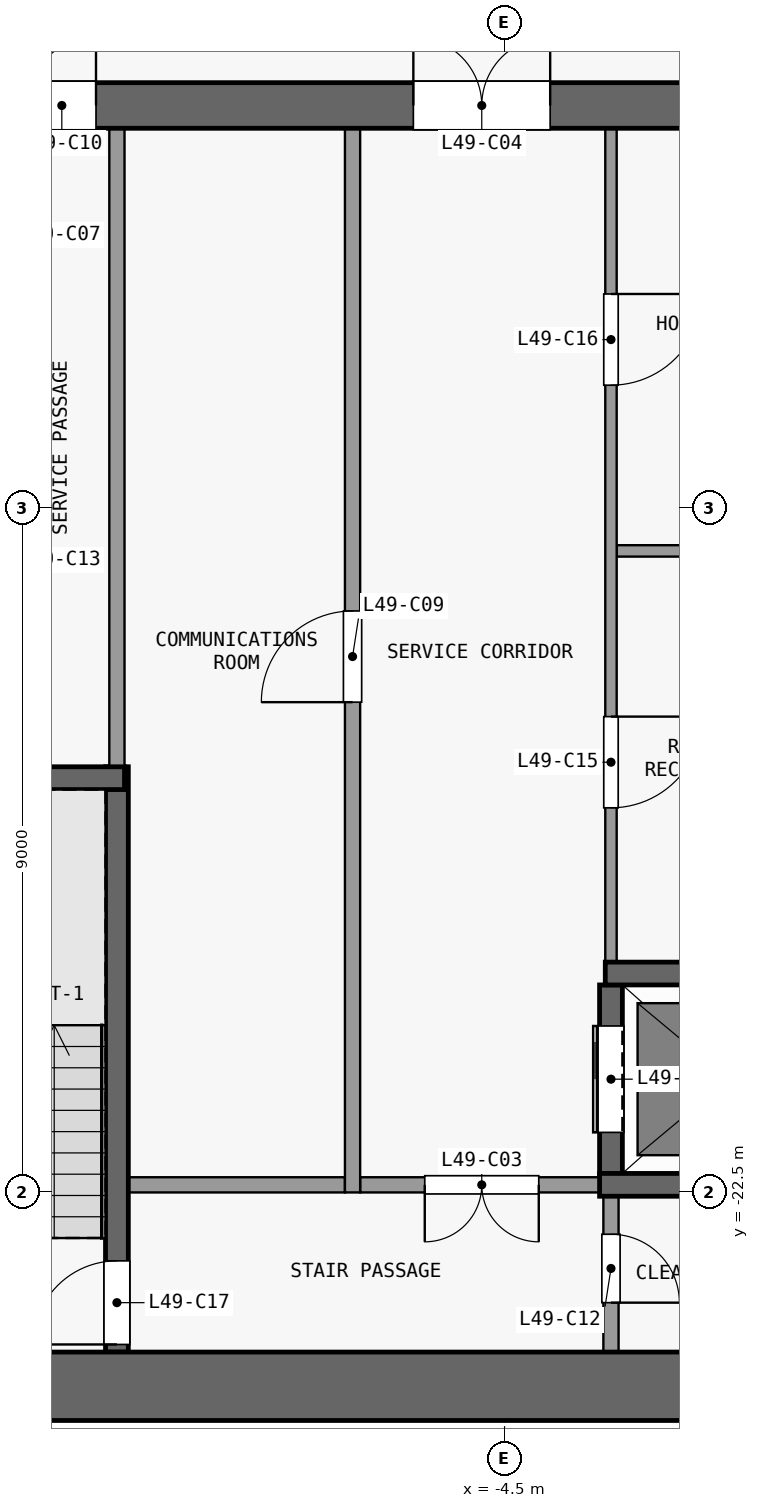
"""IFC4 building model, lengths in metres.
Left out: names, types, materials, properties, quantities, classifications, styles, units other than length and angle.
Written with IfcOpenShell. Run it as: python <this file> out.ifc"""

import sys

from ifc_helpers import new_model, si_unit, direction, frame, frame_2d, origin, place, context, subcontext, project, spatial, rectangle, extrude, element, fill, save


model = new_model("IFC4")
c1 = context("Model", 3, precision=1e-05, world=origin(), true_north=direction((0.0, 1.0)))
c2 = subcontext(c1, "Body", "Model", "MODEL_VIEW")
j1 = project(units=[si_unit("LENGTHUNIT", "METRE"), si_unit("PLANEANGLEUNIT", "RADIAN")], contexts=[c1])
p1 = place(None, origin())
s1 = spatial("IfcSite", under=j1, at=p1, CompositionType="ELEMENT")
p2 = place(p1, origin())
s2 = spatial("IfcBuilding", under=s1, at=p2, CompositionType="ELEMENT")
p3 = place(p2, frame((0.0, 0.0, 196.1)))
s3 = spatial("IfcBuildingStorey", under=s2, at=p3, CompositionType="ELEMENT", Elevation=196.1)
p4 = place(p3, frame((-13.3, -25.05, 0.0), z_axis=(0.0, 0.0, 1.0), x_axis=(1.0, 0.0, 0.0)))
e1 = element("IfcWall", 1, at=p4, inside=s3, PredefinedType="SHEAR", context=c2, shape_type="SweptSolid", body=[
    extrude(rectangle(XDim=26.6, YDim=0.9, at=frame_2d((13.3, 0.0))), origin(), (0.0, 0.0, 1.0), 3.15),
])
p5 = place(p3, frame((-13.3, -8.2, 0.0), z_axis=(0.0, 0.0, 1.0), x_axis=(1.0, 0.0, 0.0)))
e2 = element("IfcWall", 2, at=p5, inside=s3, PredefinedType="SHEAR", context=c2, shape_type="SweptSolid", body=[
    extrude(rectangle(XDim=26.6, YDim=0.6, at=frame_2d((13.3, 0.0))), origin(), (0.0, 0.0, 1.0), 3.15),
])
p6 = place(p5, frame((7.6, 0.0, 0.0)))
e3 = element("IfcOpeningElement", 3, at=p6, cuts=e2, PredefinedType="OPENING", context=c2, shape_type="SweptSolid", body=[
    extrude(rectangle(XDim=1.8, YDim=2.1, at=frame_2d((0.9, 1.05))), frame((0.0, 0.31, 0.0), z_axis=(0.0, -1.0, 0.0), x_axis=(1.0, 0.0, 0.0)), (0.0, 0.0, 1.0), 0.62),
])
p7 = place(p5, frame((17.2, 0.0, 0.0)))
e4 = element("IfcOpeningElement", 4, at=p7, cuts=e2, PredefinedType="OPENING", context=c2, shape_type="SweptSolid", body=[
    extrude(rectangle(XDim=1.8, YDim=2.1, at=frame_2d((0.9, 1.05))), frame((0.0, 0.31, 0.0), z_axis=(0.0, -1.0, 0.0), x_axis=(1.0, 0.0, 0.0)), (0.0, 0.0, 1.0), 0.62),
])
p8 = place(p5, frame((2.525, 0.0, 0.0)))
e5 = element("IfcOpeningElement", 5, at=p8, cuts=e2, PredefinedType="OPENING", context=c2, shape_type="SweptSolid", body=[
    extrude(rectangle(XDim=0.9, YDim=2.1, at=frame_2d((0.45, 1.05))), frame((0.0, 0.31, 0.0), z_axis=(0.0, -1.0, 0.0), x_axis=(1.0, 0.0, 0.0)), (0.0, 0.0, 1.0), 0.62),
])
p9 = place(p5, frame((23.175, 0.0, 0.0)))
e6 = element("IfcOpeningElement", 6, at=p9, cuts=e2, PredefinedType="OPENING", context=c2, shape_type="SweptSolid", body=[
    extrude(rectangle(XDim=0.9, YDim=2.1, at=frame_2d((0.45, 1.05))), frame((0.0, 0.31, 0.0), z_axis=(0.0, -1.0, 0.0), x_axis=(1.0, 0.0, 0.0)), (0.0, 0.0, 1.0), 0.62),
])
p10 = place(p3, frame((-9.45, -22.4, 0.0), z_axis=(0.0, 0.0, 1.0), x_axis=(1.0, 0.0, 0.0)))
e7 = element("IfcWall", 7, at=p10, inside=s3, PredefinedType="PARTITIONING", context=c2, shape_type="SweptSolid", body=[
    extrude(rectangle(XDim=2.85, YDim=0.2, at=frame_2d((1.425, 0.0))), origin(), (0.0, 0.0, 1.0), 3.15),
])
p11 = place(p3, frame((-3.25, -22.4, 0.0), z_axis=(0.0, 0.0, 1.0), x_axis=(-1.0, 0.0, 0.0)))
e8 = element("IfcWall", 8, at=p11, inside=s3, PredefinedType="PARTITIONING", context=c2, shape_type="SweptSolid", body=[
    extrude(rectangle(XDim=3.15, YDim=0.2, at=frame_2d((1.575, 0.0))), origin(), (0.0, 0.0, 1.0), 3.15),
])
p12 = place(p11, frame((0.8, 0.0, 0.0)))
e9 = element("IfcOpeningElement", 9, at=p12, cuts=e8, PredefinedType="OPENING", context=c2, shape_type="SweptSolid", body=[
    extrude(rectangle(XDim=1.5, YDim=2.1, at=frame_2d((0.75, 1.05))), frame((0.0, 0.11, 0.0), z_axis=(0.0, -1.0, 0.0), x_axis=(1.0, 0.0, 0.0)), (0.0, 0.0, 1.0), 0.22),
])
p13 = place(p3, frame((-3.25, -22.4, 0.0), z_axis=(0.0, 0.0, 1.0), x_axis=(1.0, 0.0, 0.0)))
e10 = element("IfcWall", 10, at=p13, inside=s3, PredefinedType="SHEAR", context=c2, shape_type="SweptSolid", body=[
    extrude(rectangle(XDim=6.2, YDim=0.3, at=frame_2d((3.1, 0.0))), origin(), (0.0, 0.0, 1.0), 3.15),
])
p14 = place(p3, frame((-3.175, -19.62, 0.0), z_axis=(0.0, 0.0, 1.0), x_axis=(1.0, 0.0, 0.0)))
e11 = element("IfcWall", 11, at=p14, inside=s3, PredefinedType="SHEAR", context=c2, shape_type="SweptSolid", body=[
    extrude(rectangle(XDim=3.025, YDim=0.3, at=frame_2d((1.513, 0.0))), origin(), (0.0, 0.0, 1.0), 3.15),
])
p15 = place(p3, frame((-12.6, -17.05, 0.0), z_axis=(0.0, 0.0, 1.0), x_axis=(1.0, 0.0, 0.0)))
e12 = element("IfcWall", 12, at=p15, inside=s3, PredefinedType="SHEAR", context=c2, shape_type="SweptSolid", body=[
    extrude(rectangle(XDim=3.1, YDim=0.3, at=frame_2d((1.55, 0.0))), origin(), (0.0, 0.0, 1.0), 3.15),
])
p16 = place(p3, frame((-3.025, -14.06, 0.0), z_axis=(0.0, 0.0, 1.0), x_axis=(1.0, 0.0, 0.0)))
e13 = element("IfcWall", 13, at=p16, inside=s3, PredefinedType="PARTITIONING", context=c2, shape_type="SweptSolid", body=[
    extrude(rectangle(XDim=2.875, YDim=0.15, at=frame_2d((1.438, 0.0))), origin(), (0.0, 0.0, 1.0), 3.15),
])
p17 = place(p3, frame((-9.6, -24.6, 0.0), z_axis=(0.0, 0.0, 1.0), x_axis=(0.0, 1.0, 0.0)))
e14 = element("IfcWall", 14, at=p17, inside=s3, PredefinedType="SHEAR", context=c2, shape_type="SweptSolid", body=[
    extrude(rectangle(XDim=7.7, YDim=0.3, at=frame_2d((3.85, 0.0))), origin(), (0.0, 0.0, 1.0), 3.15),
])
p18 = place(p17, frame((0.1, 0.0, 0.0)))
e15 = element("IfcOpeningElement", 15, at=p18, cuts=e14, PredefinedType="OPENING", context=c2, shape_type="SweptSolid", body=[
    extrude(rectangle(XDim=1.1, YDim=2.1, at=frame_2d((0.55, 1.05))), frame((0.0, 0.16, 0.0), z_axis=(0.0, -1.0, 0.0), x_axis=(1.0, 0.0, 0.0)), (0.0, 0.0, 1.0), 0.32),
])
p19 = place(p3, frame((-9.6, -16.9, 0.0), z_axis=(0.0, 0.0, 1.0), x_axis=(0.0, 1.0, 0.0)))
e16 = element("IfcWall", 16, at=p19, inside=s3, PredefinedType="PARTITIONING", context=c2, shape_type="SweptSolid", body=[
    extrude(rectangle(XDim=8.4, YDim=0.2, at=frame_2d((4.2, 0.0))), origin(), (0.0, 0.0, 1.0), 3.15),
])
p20 = place(p3, frame((-6.5, -22.5, 0.0), z_axis=(0.0, 0.0, 1.0), x_axis=(0.0, 1.0, 0.0)))
e17 = element("IfcWall", 17, at=p20, inside=s3, PredefinedType="PARTITIONING", context=c2, shape_type="SweptSolid", body=[
    extrude(rectangle(XDim=14.0, YDim=0.2, at=frame_2d((7.0, 0.0))), origin(), (0.0, 0.0, 1.0), 3.15),
])
p21 = place(p20, frame((6.45, 0.0, 0.0)))
e18 = element("IfcOpeningElement", 18, at=p21, cuts=e17, PredefinedType="OPENING", context=c2, shape_type="SweptSolid", body=[
    extrude(rectangle(XDim=1.2, YDim=2.1, at=frame_2d((0.6, 1.05))), frame((0.0, 0.11, 0.0), z_axis=(0.0, -1.0, 0.0), x_axis=(1.0, 0.0, 0.0)), (0.0, 0.0, 1.0), 0.22),
])
p22 = place(p3, frame((-3.1, -22.55, 0.0), z_axis=(0.0, 0.0, 1.0), x_axis=(0.0, -1.0, 0.0)))
e19 = element("IfcWall", 19, at=p22, inside=s3, PredefinedType="PARTITIONING", context=c2, shape_type="SweptSolid", body=[
    extrude(rectangle(XDim=2.05, YDim=0.2, at=frame_2d((1.025, 0.0))), origin(), (0.0, 0.0, 1.0), 3.15),
])
p23 = place(p22, frame((0.5, 0.0, 0.0)))
e20 = element("IfcOpeningElement", 20, at=p23, cuts=e19, PredefinedType="OPENING", context=c2, shape_type="SweptSolid", body=[
    extrude(rectangle(XDim=0.9, YDim=2.1, at=frame_2d((0.45, 1.05))), frame((0.0, 0.11, 0.0), z_axis=(0.0, -1.0, 0.0), x_axis=(1.0, 0.0, 0.0)), (0.0, 0.0, 1.0), 0.22),
])
p24 = place(p3, frame((-3.1, -22.25, 0.0), z_axis=(0.0, 0.0, 1.0), x_axis=(0.0, 1.0, 0.0)))
e21 = element("IfcWall", 21, at=p24, inside=s3, PredefinedType="SHEAR", context=c2, shape_type="SweptSolid", body=[
    extrude(rectangle(XDim=2.48, YDim=0.3, at=frame_2d((1.24, 0.0))), origin(), (0.0, 0.0, 1.0), 3.15),
])
p25 = place(p24, frame((0.54, 0.0, 0.0)))
e22 = element("IfcOpeningElement", 22, at=p25, cuts=e21, PredefinedType="OPENING", context=c2, shape_type="SweptSolid", body=[
    extrude(rectangle(XDim=1.4, YDim=2.1, at=frame_2d((0.7, 1.05))), frame((0.0, 0.16, 0.0), z_axis=(0.0, -1.0, 0.0), x_axis=(1.0, 0.0, 0.0)), (0.0, 0.0, 1.0), 0.32),
])
p26 = place(p3, frame((-3.1, -8.5, 0.0), z_axis=(0.0, 0.0, 1.0), x_axis=(0.0, -1.0, 0.0)))
e23 = element("IfcWall", 23, at=p26, inside=s3, PredefinedType="PARTITIONING", context=c2, shape_type="SweptSolid", body=[
    extrude(rectangle(XDim=10.97, YDim=0.15, at=frame_2d((5.485, 0.0))), origin(), (0.0, 0.0, 1.0), 3.15),
])
p27 = place(p26, frame((7.74, 0.0, 0.0)))
e24 = element("IfcOpeningElement", 24, at=p27, cuts=e23, PredefinedType="OPENING", context=c2, shape_type="SweptSolid", body=[
    extrude(rectangle(XDim=1.2, YDim=2.1, at=frame_2d((0.6, 1.05))), frame((0.0, 0.085, 0.0), z_axis=(0.0, -1.0, 0.0), x_axis=(1.0, 0.0, 0.0)), (0.0, 0.0, 1.0), 0.17),
])
p28 = place(p26, frame((2.18, 0.0, 0.0)))
e25 = element("IfcOpeningElement", 25, at=p28, cuts=e23, PredefinedType="OPENING", context=c2, shape_type="SweptSolid", body=[
    extrude(rectangle(XDim=1.2, YDim=2.1, at=frame_2d((0.6, 1.05))), frame((0.0, 0.085, 0.0), z_axis=(0.0, -1.0, 0.0), x_axis=(1.0, 0.0, 0.0)), (0.0, 0.0, 1.0), 0.17),
])
p29 = place(p25, origin())
e26 = element("IfcDoor", 26, at=p29, inside=s3, OperationType="DOUBLE_DOOR_SLIDING", PredefinedType="DOOR", context=c2, shape_type="SweptSolid", body=[
    extrude(rectangle(XDim=1.4, YDim=2.1, at=frame_2d((0.7, 1.05))), frame((0.0, 0.025, 0.0), z_axis=(0.0, -1.0, 0.0), x_axis=(1.0, 0.0, 0.0)), (0.0, 0.0, 1.0), 0.05),
])
fill(e22, e26)
p30 = place(p12, origin())
e27 = element("IfcDoor", 27, at=p30, inside=s3, OperationType="DOUBLE_DOOR_SINGLE_SWING", PredefinedType="DOOR", context=c2, shape_type="SweptSolid", body=[
    extrude(rectangle(XDim=1.5, YDim=2.1, at=frame_2d((0.75, 1.05))), frame((0.0, 0.025, 0.0), z_axis=(0.0, -1.0, 0.0), x_axis=(1.0, 0.0, 0.0)), (0.0, 0.0, 1.0), 0.05),
])
fill(e9, e27)
p31 = place(p6, origin())
e28 = element("IfcDoor", 28, at=p31, inside=s3, OperationType="DOUBLE_DOOR_SINGLE_SWING", PredefinedType="DOOR", context=c2, shape_type="SweptSolid", body=[
    extrude(rectangle(XDim=1.8, YDim=2.1, at=frame_2d((0.9, 1.05))), frame((0.0, 0.025, 0.0), z_axis=(0.0, -1.0, 0.0), x_axis=(1.0, 0.0, 0.0)), (0.0, 0.0, 1.0), 0.05),
])
fill(e3, e28)
p32 = place(p21, origin())
e29 = element("IfcDoor", 29, at=p32, inside=s3, OperationType="SINGLE_SWING_LEFT", PredefinedType="DOOR", context=c2, shape_type="SweptSolid", body=[
    extrude(rectangle(XDim=1.2, YDim=2.1, at=frame_2d((0.6, 1.05))), frame((0.0, 0.025, 0.0), z_axis=(0.0, -1.0, 0.0), x_axis=(1.0, 0.0, 0.0)), (0.0, 0.0, 1.0), 0.05),
])
fill(e18, e29)
p33 = place(p8, origin())
e30 = element("IfcDoor", 30, at=p33, inside=s3, OperationType="SINGLE_SWING_RIGHT", PredefinedType="DOOR", context=c2, shape_type="SweptSolid", body=[
    extrude(rectangle(XDim=0.9, YDim=2.1, at=frame_2d((0.45, 1.05))), frame((0.0, 0.025, 0.0), z_axis=(0.0, -1.0, 0.0), x_axis=(1.0, 0.0, 0.0)), (0.0, 0.0, 1.0), 0.05),
])
fill(e5, e30)
p34 = place(p23, origin())
e31 = element("IfcDoor", 31, at=p34, inside=s3, OperationType="SINGLE_SWING_RIGHT", PredefinedType="DOOR", context=c2, shape_type="SweptSolid", body=[
    extrude(rectangle(XDim=0.9, YDim=2.1, at=frame_2d((0.45, 1.05))), frame((0.0, 0.025, 0.0), z_axis=(0.0, -1.0, 0.0), x_axis=(1.0, 0.0, 0.0)), (0.0, 0.0, 1.0), 0.05),
])
fill(e20, e31)
p35 = place(p27, origin())
e32 = element("IfcDoor", 32, at=p35, inside=s3, OperationType="SINGLE_SWING_LEFT", PredefinedType="DOOR", context=c2, shape_type="SweptSolid", body=[
    extrude(rectangle(XDim=1.2, YDim=2.1, at=frame_2d((0.6, 1.05))), frame((0.0, 0.025, 0.0), z_axis=(0.0, -1.0, 0.0), x_axis=(1.0, 0.0, 0.0)), (0.0, 0.0, 1.0), 0.05),
])
fill(e24, e32)
p36 = place(p28, origin())
e33 = element("IfcDoor", 33, at=p36, inside=s3, OperationType="SINGLE_SWING_LEFT", PredefinedType="DOOR", context=c2, shape_type="SweptSolid", body=[
    extrude(rectangle(XDim=1.2, YDim=2.1, at=frame_2d((0.6, 1.05))), frame((0.0, 0.025, 0.0), z_axis=(0.0, -1.0, 0.0), x_axis=(1.0, 0.0, 0.0)), (0.0, 0.0, 1.0), 0.05),
])
fill(e25, e33)
p37 = place(p18, origin())
e34 = element("IfcDoor", 34, at=p37, inside=s3, OperationType="SINGLE_SWING_LEFT", PredefinedType="DOOR", context=c2, shape_type="SweptSolid", body=[
    extrude(rectangle(XDim=1.1, YDim=2.1, at=frame_2d((0.55, 1.05))), frame((0.0, 0.025, 0.0), z_axis=(0.0, -1.0, 0.0), x_axis=(1.0, 0.0, 0.0)), (0.0, 0.0, 1.0), 0.05),
])
fill(e15, e34)
save(model, sys.argv[1])
